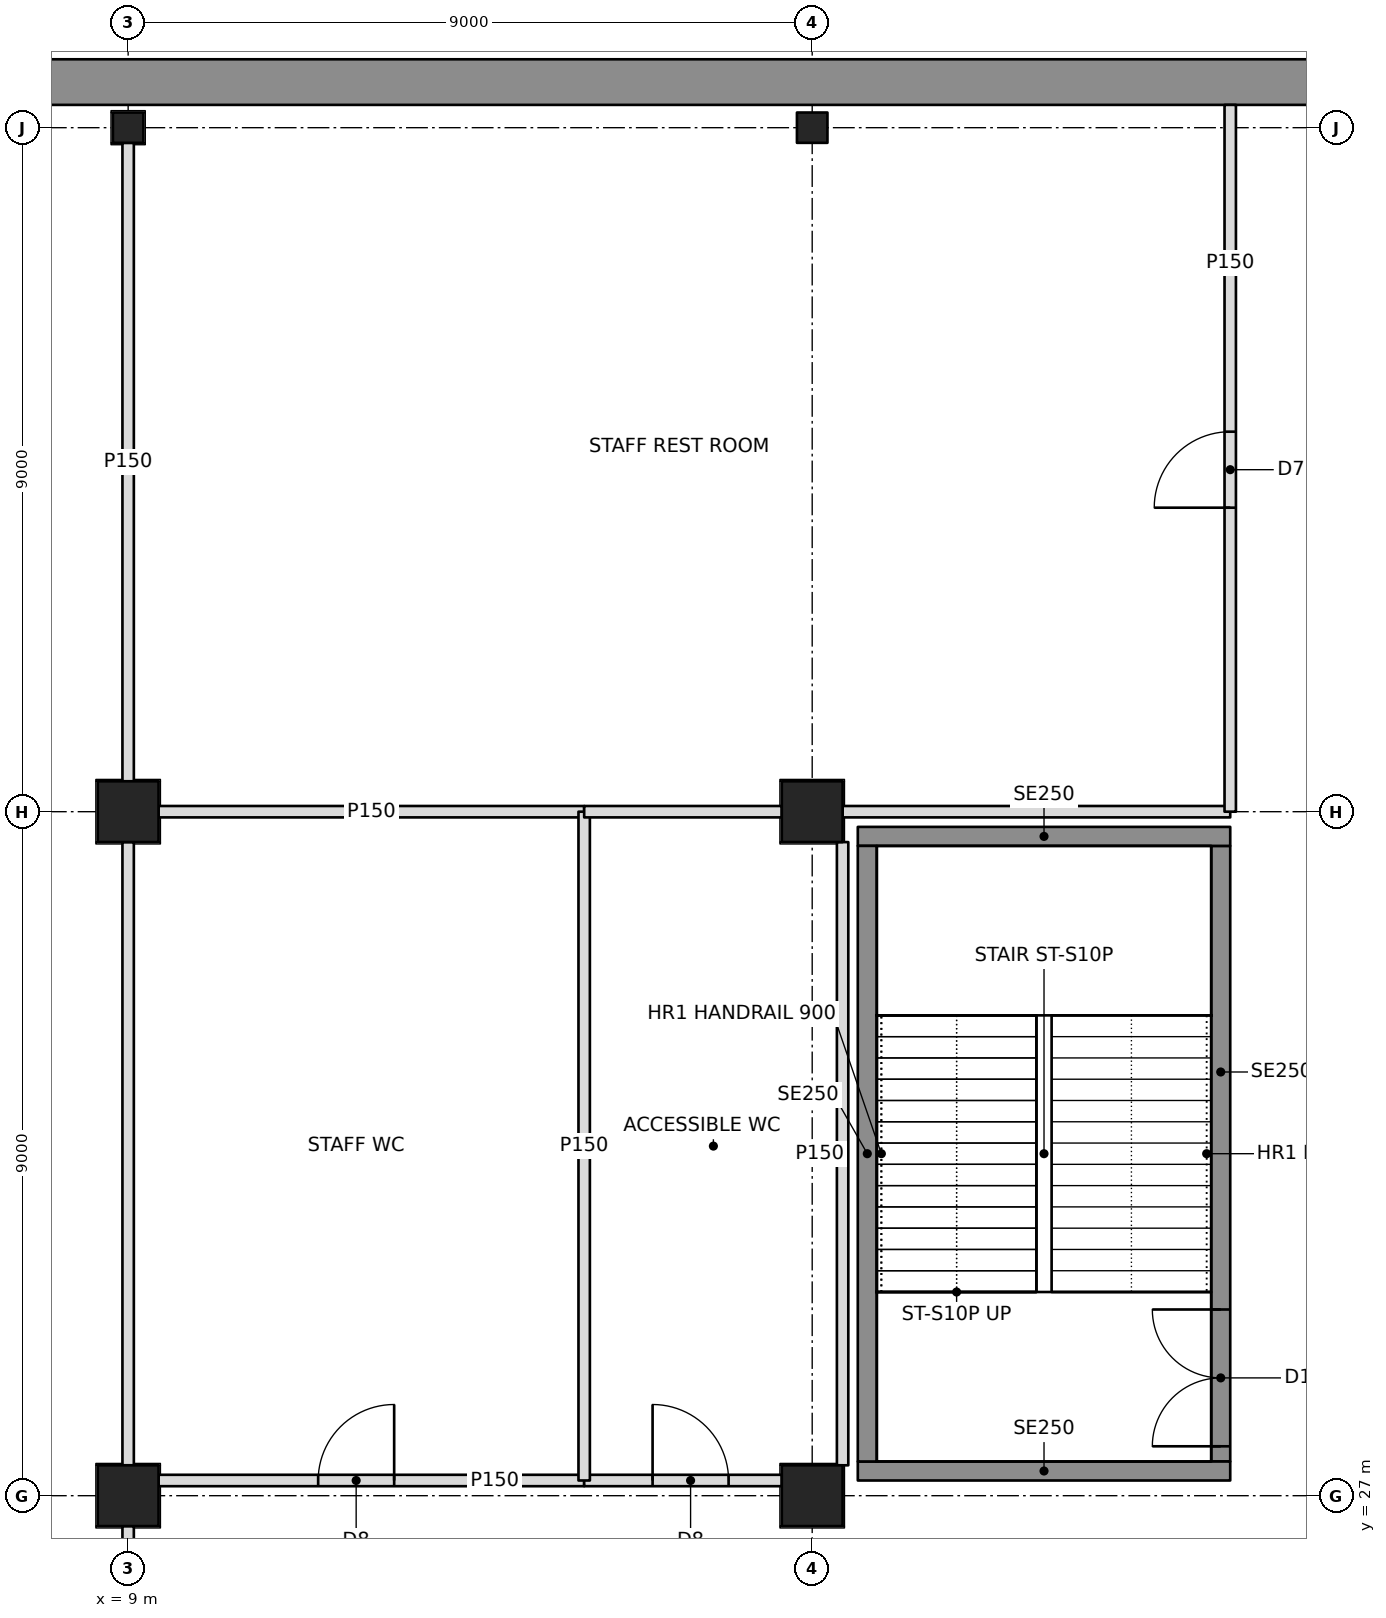
"""IFC4 building model, lengths in metres.
Left out: names, types, materials, properties, quantities, classifications, styles, units other than length and angle.
Written with IfcOpenShell. Run it as: python <this file> out.ifc"""

import sys

from ifc_helpers import new_model, si_unit, direction, frame, frame_2d, origin, origin_2d, place, context, subcontext, project, spatial, rectangle, hollow_rectangle, i_section, extrude, element, fill, save


model = new_model("IFC4")
c1 = context("Model", 3, precision=1e-05, world=origin(), true_north=direction((0.0, 1.0)))
c2 = subcontext(c1, "Body", "Model", "MODEL_VIEW")
j1 = project(units=[si_unit("LENGTHUNIT", "METRE"), si_unit("PLANEANGLEUNIT", "RADIAN")], contexts=[c1])
p1 = place(None, origin())
s1 = spatial("IfcSite", under=j1, at=p1, CompositionType="ELEMENT")
p2 = place(p1, origin())
s2 = spatial("IfcBuilding", under=s1, at=p2, CompositionType="ELEMENT")
p3 = place(p2, frame((0.0, 0.0, -10.5)))
s3 = spatial("IfcBuildingStorey", under=s2, at=p3, CompositionType="ELEMENT", Elevation=-10.5)
for number, where, z_axis, x_axis in (
    (1, (9.0, 27.0, -0.5), (0.0, 0.0, 1.0), (1.0, 0.0, 0.0)),
    (2, (9.0, 36.0, -0.5), (0.0, 0.0, 1.0), (1.0, 0.0, 0.0)),
):
    element("IfcColumn", number, at=place(p3, frame(where, z_axis=z_axis, x_axis=x_axis)), inside=s3, PredefinedType="COLUMN", context=c2, shape_type="SweptSolid", body=[
        extrude(hollow_rectangle(XDim=0.8, YDim=0.8, WallThickness=0.1, at=origin_2d()), origin(), (0.0, 0.0, 1.0), 5.5),
    ])
p4 = place(p3, frame((9.0, 45.0, -0.5), z_axis=(0.0, 0.0, 1.0), x_axis=(1.0, 0.0, 0.0)))
e3 = element("IfcColumn", 3, at=p4, inside=s3, PredefinedType="COLUMN", context=c2, shape_type="SweptSolid", body=[
    extrude(i_section(OverallWidth=0.401, OverallDepth=0.399, WebThickness=0.025, FlangeThickness=0.04, at=origin_2d()), origin(), (0.0, 0.0, 1.0), 5.5),
])
for number, where, z_axis, x_axis in (
    (4, (18.0, 27.0, -0.5), (0.0, 0.0, 1.0), (1.0, 0.0, 0.0)),
    (5, (18.0, 36.0, -0.5), (0.0, 0.0, 1.0), (1.0, 0.0, 0.0)),
):
    element("IfcColumn", number, at=place(p3, frame(where, z_axis=z_axis, x_axis=x_axis)), inside=s3, PredefinedType="COLUMN", context=c2, shape_type="SweptSolid", body=[
        extrude(hollow_rectangle(XDim=0.8, YDim=0.8, WallThickness=0.1, at=origin_2d()), origin(), (0.0, 0.0, 1.0), 5.5),
    ])
p5 = place(p3, frame((18.0, 45.0, -0.5), z_axis=(0.0, 0.0, 1.0), x_axis=(1.0, 0.0, 0.0)))
e6 = element("IfcColumn", 6, at=p5, inside=s3, PredefinedType="COLUMN", context=c2, shape_type="SweptSolid", body=[
    extrude(i_section(OverallWidth=0.401, OverallDepth=0.399, WebThickness=0.025, FlangeThickness=0.04, at=origin_2d()), origin(), (0.0, 0.0, 1.0), 5.5),
])
p6 = place(p3, frame((63.6, 45.6, 0.0), z_axis=(0.0, 0.0, 1.0), x_axis=(-1.0, 0.0, 0.0)))
e7 = element("IfcWall", 7, at=p6, inside=s3, PredefinedType="SOLIDWALL", context=c2, shape_type="SweptSolid", body=[
    extrude(rectangle(XDim=73.2, YDim=0.6, at=frame_2d((36.6, 0.0))), origin(), (0.0, 0.0, 1.0), 4.7),
])
p7 = place(p3, frame((9.0, 26.6, 0.0), z_axis=(0.0, 0.0, 1.0), x_axis=(0.0, -1.0, 0.0)))
e8 = element("IfcWall", 8, at=p7, inside=s3, PredefinedType="PARTITIONING", context=c2, shape_type="SweptSolid", body=[
    extrude(rectangle(XDim=2.875, YDim=0.15, at=frame_2d((1.438, 0.0))), origin(), (0.0, 0.0, 1.0), 3.842),
])
p8 = place(p3, frame((15.0, 27.2, 0.0), z_axis=(0.0, 0.0, 1.0), x_axis=(-1.0, 0.0, 0.0)))
e9 = element("IfcWall", 9, at=p8, inside=s3, PredefinedType="PARTITIONING", context=c2, shape_type="SweptSolid", body=[
    extrude(rectangle(XDim=5.6, YDim=0.15, at=frame_2d((2.8, 0.0))), origin(), (0.0, 0.0, 1.0), 3.842),
])
p9 = place(p8, frame((2.5, 0.0, 0.0)))
e10 = element("IfcOpeningElement", 10, at=p9, cuts=e9, PredefinedType="OPENING", context=c2, shape_type="SweptSolid", body=[
    extrude(rectangle(XDim=1.0, YDim=2.1, at=frame_2d((0.5, 1.05))), frame((0.0, 0.085, 0.0), z_axis=(0.0, -1.0, 0.0), x_axis=(1.0, 0.0, 0.0)), (0.0, 0.0, 1.0), 0.17),
])
p10 = place(p3, frame((9.0, 35.6, 0.0), z_axis=(0.0, 0.0, 1.0), x_axis=(0.0, -1.0, 0.0)))
e11 = element("IfcWall", 11, at=p10, inside=s3, PredefinedType="PARTITIONING", context=c2, shape_type="SweptSolid", body=[
    extrude(rectangle(XDim=8.2, YDim=0.15, at=frame_2d((4.1, 0.0))), origin(), (0.0, 0.0, 1.0), 3.842),
])
p11 = place(p3, frame((9.4, 36.0, 0.0), z_axis=(0.0, 0.0, 1.0), x_axis=(1.0, 0.0, 0.0)))
e12 = element("IfcWall", 12, at=p11, inside=s3, PredefinedType="PARTITIONING", context=c2, shape_type="SweptSolid", body=[
    extrude(rectangle(XDim=5.6, YDim=0.15, at=frame_2d((2.8, 0.0))), origin(), (0.0, 0.0, 1.0), 3.842),
])
p12 = place(p3, frame((9.0, 44.801, 0.0), z_axis=(0.0, 0.0, 1.0), x_axis=(0.0, -1.0, 0.0)))
e13 = element("IfcWall", 13, at=p12, inside=s3, PredefinedType="PARTITIONING", context=c2, shape_type="SweptSolid", body=[
    extrude(rectangle(XDim=8.401, YDim=0.15, at=frame_2d((4.2, 0.0))), origin(), (0.0, 0.0, 1.0), 3.842),
])
p13 = place(p3, frame((17.6, 27.2, 0.0), z_axis=(0.0, 0.0, 1.0), x_axis=(-1.0, 0.0, 0.0)))
e14 = element("IfcWall", 14, at=p13, inside=s3, PredefinedType="PARTITIONING", context=c2, shape_type="SweptSolid", body=[
    extrude(rectangle(XDim=2.6, YDim=0.15, at=frame_2d((1.3, 0.0))), origin(), (0.0, 0.0, 1.0), 3.842),
])
p14 = place(p13, frame((0.7, 0.0, 0.0)))
e15 = element("IfcOpeningElement", 15, at=p14, cuts=e14, PredefinedType="OPENING", context=c2, shape_type="SweptSolid", body=[
    extrude(rectangle(XDim=1.0, YDim=2.1, at=frame_2d((0.5, 1.05))), frame((0.0, 0.085, 0.0), z_axis=(0.0, -1.0, 0.0), x_axis=(1.0, 0.0, 0.0)), (0.0, 0.0, 1.0), 0.17),
])
p15 = place(p3, frame((15.0, 36.0, 0.0), z_axis=(0.0, 0.0, 1.0), x_axis=(0.0, -1.0, 0.0)))
e16 = element("IfcWall", 16, at=p15, inside=s3, PredefinedType="PARTITIONING", context=c2, shape_type="SweptSolid", body=[
    extrude(rectangle(XDim=8.8, YDim=0.15, at=frame_2d((4.4, 0.0))), origin(), (0.0, 0.0, 1.0), 3.841),
])
p16 = place(p3, frame((15.0, 36.0, 0.0), z_axis=(0.0, 0.0, 1.0), x_axis=(1.0, 0.0, 0.0)))
e17 = element("IfcWall", 17, at=p16, inside=s3, PredefinedType="PARTITIONING", context=c2, shape_type="SweptSolid", body=[
    extrude(rectangle(XDim=2.6, YDim=0.15, at=frame_2d((1.3, 0.0))), origin(), (0.0, 0.0, 1.0), 3.842),
])
p17 = place(p3, frame((18.4, 35.6, 0.0), z_axis=(0.0, 0.0, 1.0), x_axis=(0.0, -1.0, 0.0)))
e18 = element("IfcWall", 18, at=p17, inside=s3, PredefinedType="PARTITIONING", context=c2, shape_type="SweptSolid", body=[
    extrude(rectangle(XDim=8.2, YDim=0.15, at=frame_2d((4.1, 0.0))), origin(), (0.0, 0.0, 1.0), 4.7),
])
p18 = place(p3, frame((23.5, 36.0, 0.0), z_axis=(0.0, 0.0, 1.0), x_axis=(-1.0, 0.0, 0.0)))
e19 = element("IfcWall", 19, at=p18, inside=s3, PredefinedType="PARTITIONING", context=c2, shape_type="SweptSolid", body=[
    extrude(rectangle(XDim=5.1, YDim=0.15, at=frame_2d((2.55, 0.0))), origin(), (0.0, 0.0, 1.0), 3.842),
])
p19 = place(p3, frame((23.5, 45.3, 0.0), z_axis=(0.0, 0.0, 1.0), x_axis=(0.0, -1.0, 0.0)))
e20 = element("IfcWall", 20, at=p19, inside=s3, PredefinedType="PARTITIONING", context=c2, shape_type="SweptSolid", body=[
    extrude(rectangle(XDim=9.3, YDim=0.15, at=frame_2d((4.65, 0.0))), origin(), (0.0, 0.0, 1.0), 3.841),
])
p20 = place(p19, frame((4.3, 0.0, 0.0)))
e21 = element("IfcOpeningElement", 21, at=p20, cuts=e20, PredefinedType="OPENING", context=c2, shape_type="SweptSolid", body=[
    extrude(rectangle(XDim=1.0, YDim=2.1, at=frame_2d((0.5, 1.05))), frame((0.0, 0.085, 0.0), z_axis=(0.0, -1.0, 0.0), x_axis=(1.0, 0.0, 0.0)), (0.0, 0.0, 1.0), 0.17),
])
for number, where, z_axis, x_axis in (
    (22, (18.6, 27.325, 0.0), (0.0, 0.0, 1.0), (1.0, 0.0, 0.0)),
    (23, (18.6, 35.675, 0.0), (0.0, 0.0, 1.0), (1.0, 0.0, 0.0)),
):
    element("IfcWall", number, at=place(p3, frame(where, z_axis=z_axis, x_axis=x_axis)), inside=s3, PredefinedType="SOLIDWALL", context=c2, shape_type="SweptSolid", body=[
        extrude(rectangle(XDim=4.9, YDim=0.25, at=frame_2d((2.45, 0.0))), origin(), (0.0, 0.0, 1.0), 4.7),
    ])
p21 = place(p3, frame((18.725, 27.45, 0.0), z_axis=(0.0, 0.0, 1.0), x_axis=(0.0, 1.0, 0.0)))
e24 = element("IfcWall", 24, at=p21, inside=s3, PredefinedType="SOLIDWALL", context=c2, shape_type="SweptSolid", body=[
    extrude(rectangle(XDim=8.1, YDim=0.25, at=frame_2d((4.05, 0.0))), origin(), (0.0, 0.0, 1.0), 4.7),
])
p22 = place(p3, frame((23.375, 27.45, 0.0), z_axis=(0.0, 0.0, 1.0), x_axis=(0.0, 1.0, 0.0)))
e25 = element("IfcWall", 25, at=p22, inside=s3, PredefinedType="SOLIDWALL", context=c2, shape_type="SweptSolid", body=[
    extrude(rectangle(XDim=8.1, YDim=0.25, at=frame_2d((4.05, 0.0))), origin(), (0.0, 0.0, 1.0), 4.7),
])
p23 = place(p22, frame((0.2, 0.0, 0.0)))
e26 = element("IfcOpeningElement", 26, at=p23, cuts=e25, PredefinedType="OPENING", context=c2, shape_type="SweptSolid", body=[
    extrude(rectangle(XDim=1.8, YDim=2.1, at=frame_2d((0.9, 1.05))), frame((0.0, 0.135, 0.0), z_axis=(0.0, -1.0, 0.0), x_axis=(1.0, 0.0, 0.0)), (0.0, 0.0, 1.0), 0.27),
])
p24 = place(p9, frame((1.0, 0.0, 0.0), z_axis=(0.0, 0.0, 1.0), x_axis=(-1.0, 0.0, 0.0)))
e27 = element("IfcDoor", 27, at=p24, inside=s3, OperationType="SINGLE_SWING_RIGHT", PredefinedType="DOOR", context=c2, shape_type="SweptSolid", body=[
    extrude(rectangle(XDim=1.0, YDim=2.1, at=frame_2d((0.5, 1.05))), frame((0.0, 0.025, 0.0), z_axis=(0.0, -1.0, 0.0), x_axis=(1.0, 0.0, 0.0)), (0.0, 0.0, 1.0), 0.05),
])
fill(e10, e27)
p25 = place(p14, frame((1.0, 0.0, 0.0), z_axis=(0.0, 0.0, 1.0), x_axis=(-1.0, 0.0, 0.0)))
e28 = element("IfcDoor", 28, at=p25, inside=s3, OperationType="SINGLE_SWING_LEFT", PredefinedType="DOOR", context=c2, shape_type="SweptSolid", body=[
    extrude(rectangle(XDim=1.0, YDim=2.1, at=frame_2d((0.5, 1.05))), frame((0.0, 0.025, 0.0), z_axis=(0.0, -1.0, 0.0), x_axis=(1.0, 0.0, 0.0)), (0.0, 0.0, 1.0), 0.05),
])
fill(e15, e28)
p26 = place(p20, frame((1.0, 0.0, 0.0), z_axis=(0.0, 0.0, 1.0), x_axis=(-1.0, 0.0, 0.0)))
e29 = element("IfcDoor", 29, at=p26, inside=s3, OperationType="SINGLE_SWING_LEFT", PredefinedType="DOOR", context=c2, shape_type="SweptSolid", body=[
    extrude(rectangle(XDim=1.0, YDim=2.1, at=frame_2d((0.5, 1.05))), frame((0.0, 0.025, 0.0), z_axis=(0.0, -1.0, 0.0), x_axis=(1.0, 0.0, 0.0)), (0.0, 0.0, 1.0), 0.05),
])
fill(e21, e29)
p27 = place(p23, origin())
e30 = element("IfcDoor", 30, at=p27, inside=s3, OperationType="DOUBLE_DOOR_SINGLE_SWING", PredefinedType="DOOR", context=c2, shape_type="SweptSolid", body=[
    extrude(rectangle(XDim=1.8, YDim=2.1, at=frame_2d((0.9, 1.05))), frame((0.0, 0.025, 0.0), z_axis=(0.0, -1.0, 0.0), x_axis=(1.0, 0.0, 0.0)), (0.0, 0.0, 1.0), 0.05),
])
fill(e26, e30)
save(model, sys.argv[1])
